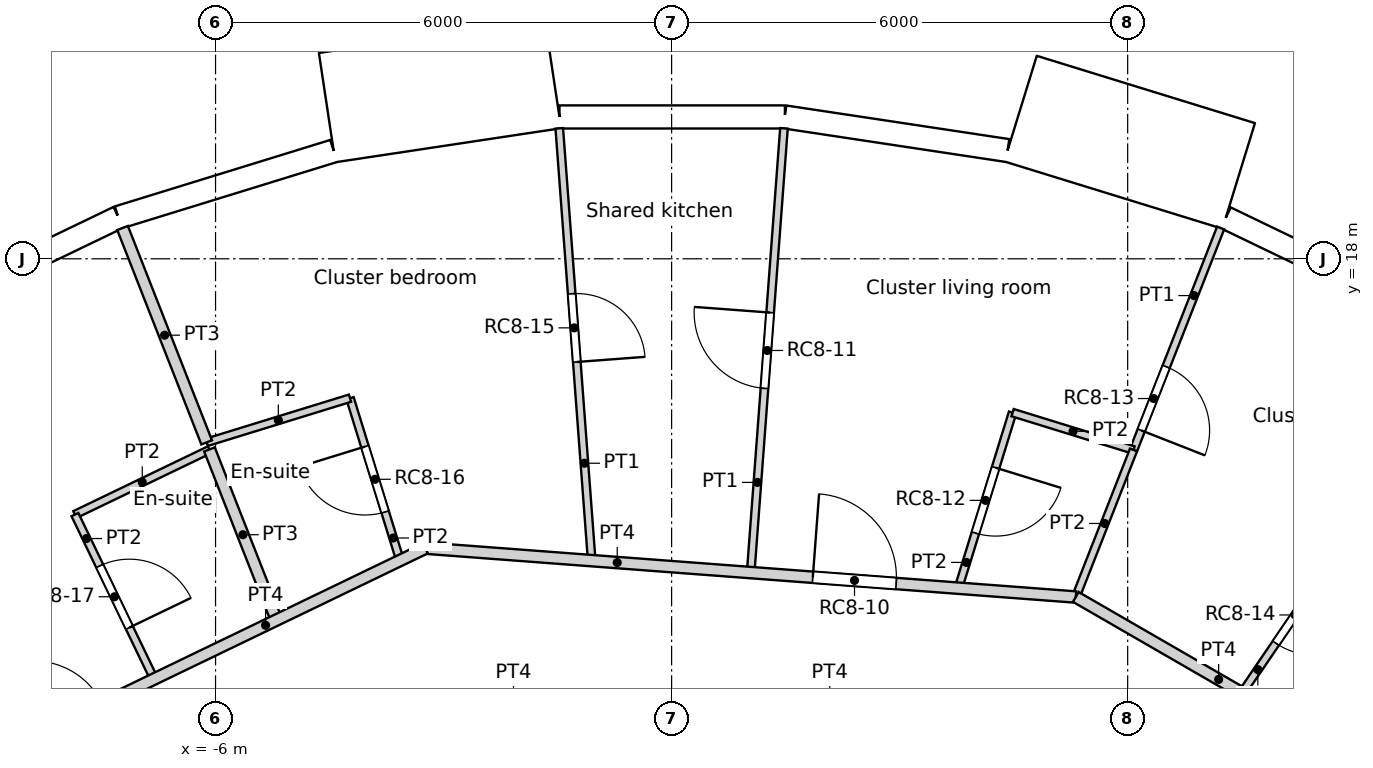
"""IFC4 building model, lengths in metres.
Left out: names, types, materials, properties, quantities, classifications, styles, units other than length and angle.
Written with IfcOpenShell. Run it as: python <this file> out.ifc"""

import sys

from ifc_helpers import new_model, si_unit, direction, frame, frame_2d, origin, origin_2d, place, context, subcontext, project, spatial, rectangle, circle, extrude, element, fill, save


model = new_model("IFC4")
c1 = context("Model", 3, precision=1e-05, world=origin(), true_north=direction((0.0, 1.0)))
c2 = subcontext(c1, "Body", "Model", "MODEL_VIEW")
j1 = project(units=[si_unit("LENGTHUNIT", "METRE"), si_unit("PLANEANGLEUNIT", "RADIAN")], contexts=[c1])
p1 = place(None, origin())
s1 = spatial("IfcSite", under=j1, at=p1, CompositionType="ELEMENT")
p2 = place(p1, origin())
s2 = spatial("IfcBuilding", under=s1, at=p2, CompositionType="ELEMENT")
p3 = place(p2, frame((0.0, 0.0, 305.4)))
s3 = spatial("IfcBuildingStorey", under=s2, at=p3, CompositionType="ELEMENT", Elevation=305.4)
for number, where, z_axis, x_axis in (
    (1, (6.876, 17.521, 0.0), (0.0, 0.0, 1.0), (1.0, 0.0, 0.0)),
    (2, (1.406, 18.77, 0.0), (0.0, 0.0, 1.0), (1.0, 0.0, 0.0)),
    (3, (-4.188, 18.35, 0.0), (0.0, 0.0, 1.0), (1.0, 0.0, 0.0)),
):
    element("IfcColumn", number, at=place(p3, frame(where, z_axis=z_axis, x_axis=x_axis)), inside=s3, PredefinedType="COLUMN", context=c2, shape_type="SweptSolid", body=[
        extrude(circle(Radius=0.45, at=origin_2d()), origin(), (0.0, 0.0, 1.0), 3.6),
    ])
p4 = place(p3, frame((9.961, 17.253, 0.0), z_axis=(0.0, 0.0, 1.0), x_axis=(-0.90095513435, 0.433912255978, 0.0)))
e4 = element("IfcWall", 4, at=p4, inside=s3, PredefinedType="SOLIDWALL", context=c2, shape_type="SweptSolid", body=[
    extrude(rectangle(XDim=2.962, YDim=0.3, at=frame_2d((1.481, 0.0))), origin(), (0.0, 0.0, 1.0), 3.25),
])
p5 = place(p4, frame((1.481, 0.0, 1.55)))
e5 = element("IfcOpeningElement", 5, at=p5, cuts=e4, PredefinedType="OPENING", context=c2, shape_type="SweptSolid", body=[
    extrude(circle(Radius=0.9, at=origin_2d()), frame((0.0, 0.16, 0.0), z_axis=(0.0, -1.0, 0.0), x_axis=(1.0, 0.0, 0.0)), (0.0, 0.0, 1.0), 0.32),
])
p6 = place(p3, frame((7.458, 19.091, -0.35), z_axis=(0.0, 0.0, 1.0), x_axis=(-0.955571139978, 0.294760574774, 0.0)))
e6 = element("IfcWall", 6, at=p6, inside=s3, PredefinedType="ELEMENTEDWALL", context=c2, shape_type="SweptSolid", body=[
    extrude(rectangle(XDim=3.0, YDim=1.45, at=frame_2d((1.5, 0.0))), origin(), (0.0, 0.0, 1.0), 3.6),
])
p7 = place(p6, frame((1.5, 0.0, 1.9)))
e7 = element("IfcOpeningElement", 7, at=p7, cuts=e6, PredefinedType="OPENING", context=c2, shape_type="SweptSolid", body=[
    extrude(circle(Radius=0.9, at=origin_2d()), frame((0.0, 0.735, 0.0), z_axis=(0.0, -1.0, 0.0), x_axis=(1.0, 0.0, 0.0)), (0.0, 0.0, 1.0), 1.47),
])
p8 = place(p3, frame((4.418, 19.425, 0.0), z_axis=(0.0, 0.0, 1.0), x_axis=(-0.988835775663, 0.149009425104, 0.0)))
e8 = element("IfcWall", 8, at=p8, inside=s3, PredefinedType="SOLIDWALL", context=c2, shape_type="SweptSolid", body=[
    extrude(rectangle(XDim=2.962, YDim=0.3, at=frame_2d((1.481, 0.0))), origin(), (0.0, 0.0, 1.0), 2.8),
])
p9 = place(p8, frame((1.481, 0.0, 1.55)))
e9 = element("IfcOpeningElement", 9, at=p9, cuts=e8, PredefinedType="OPENING", context=c2, shape_type="SweptSolid", body=[
    extrude(circle(Radius=0.9, at=origin_2d()), frame((0.0, 0.16, 0.0), z_axis=(0.0, -1.0, 0.0), x_axis=(1.0, 0.0, 0.0)), (0.0, 0.0, 1.0), 0.32),
])
p10 = place(p3, frame((1.489, 19.866, 0.0), z_axis=(0.0, 0.0, 1.0), x_axis=(-1.0, 0.0, 0.0)))
e10 = element("IfcWall", 10, at=p10, inside=s3, PredefinedType="SOLIDWALL", context=c2, shape_type="SweptSolid", body=[
    extrude(rectangle(XDim=2.962, YDim=0.3, at=frame_2d((1.481, 0.0))), origin(), (0.0, 0.0, 1.0), 3.25),
])
p11 = place(p10, frame((1.481, 0.0, 1.55)))
e11 = element("IfcOpeningElement", 11, at=p11, cuts=e10, PredefinedType="OPENING", context=c2, shape_type="SweptSolid", body=[
    extrude(circle(Radius=0.9, at=origin_2d()), frame((0.0, 0.16, 0.0), z_axis=(0.0, -1.0, 0.0), x_axis=(1.0, 0.0, 0.0)), (0.0, 0.0, 1.0), 0.32),
])
p12 = place(p3, frame((-1.563, 20.436, -0.35), z_axis=(0.0, 0.0, 1.0), x_axis=(-0.988836445254, -0.149004981587, 0.0)))
e12 = element("IfcWall", 12, at=p12, inside=s3, PredefinedType="ELEMENTEDWALL", context=c2, shape_type="SweptSolid", body=[
    extrude(rectangle(XDim=3.0, YDim=1.45, at=frame_2d((1.5, 0.0))), origin(), (0.0, 0.0, 1.0), 3.6),
])
p13 = place(p12, frame((1.5, 0.0, 1.9)))
e13 = element("IfcOpeningElement", 13, at=p13, cuts=e12, PredefinedType="OPENING", context=c2, shape_type="SweptSolid", body=[
    extrude(circle(Radius=0.9, at=origin_2d()), frame((0.0, 0.735, 0.0), z_axis=(0.0, -1.0, 0.0), x_axis=(1.0, 0.0, 0.0)), (0.0, 0.0, 1.0), 1.47),
])
p14 = place(p3, frame((-4.448, 19.418, 0.0), z_axis=(0.0, 0.0, 1.0), x_axis=(-0.95558635705, -0.294711238707, 0.0)))
e14 = element("IfcWall", 14, at=p14, inside=s3, PredefinedType="SOLIDWALL", context=c2, shape_type="SweptSolid", body=[
    extrude(rectangle(XDim=2.962, YDim=0.3, at=frame_2d((1.481, 0.0))), origin(), (0.0, 0.0, 1.0), 2.8),
])
p15 = place(p14, frame((1.481, 0.0, 1.55)))
e15 = element("IfcOpeningElement", 15, at=p15, cuts=e14, PredefinedType="OPENING", context=c2, shape_type="SweptSolid", body=[
    extrude(circle(Radius=0.9, at=origin_2d()), frame((0.0, 0.16, 0.0), z_axis=(0.0, -1.0, 0.0), x_axis=(1.0, 0.0, 0.0)), (0.0, 0.0, 1.0), 0.32),
])
p16 = place(p3, frame((-7.278, 18.545, 0.0), z_axis=(0.0, 0.0, 1.0), x_axis=(-0.900939615635, -0.433944476838, 0.0)))
e16 = element("IfcWall", 16, at=p16, inside=s3, PredefinedType="SOLIDWALL", context=c2, shape_type="SweptSolid", body=[
    extrude(rectangle(XDim=2.962, YDim=0.3, at=frame_2d((1.481, 0.0))), origin(), (0.0, 0.0, 1.0), 3.25),
])
p17 = place(p16, frame((1.481, 0.0, 1.55)))
e17 = element("IfcOpeningElement", 17, at=p17, cuts=e16, PredefinedType="OPENING", context=c2, shape_type="SweptSolid", body=[
    extrude(circle(Radius=0.9, at=origin_2d()), frame((0.0, 0.16, 0.0), z_axis=(0.0, -1.0, 0.0), x_axis=(1.0, 0.0, 0.0)), (0.0, 0.0, 1.0), 0.32),
])
p18 = place(p3, frame((-3.239, 14.193, 0.0), z_axis=(0.0, 0.0, 1.0), x_axis=(0.997187999346, -0.074940602878, 0.0)))
e18 = element("IfcWall", 18, at=p18, inside=s3, PredefinedType="PARTITIONING", context=c2, shape_type="SweptSolid", body=[
    extrude(rectangle(XDim=8.581, YDim=0.15, at=frame_2d((4.291, 0.0))), origin(), (0.0, 0.0, 1.0), 3.25),
])
p19 = place(p18, frame((5.111, 0.0, 0.0)))
e19 = element("IfcOpeningElement", 19, at=p19, cuts=e18, PredefinedType="OPENING", context=c2, shape_type="SweptSolid", body=[
    extrude(rectangle(XDim=1.1, YDim=2.1, at=frame_2d((0.55, 1.05))), frame((0.0, 0.075, 0.0), z_axis=(0.0, -1.0, 0.0), x_axis=(1.0, 0.0, 0.0)), (0.0, 0.0, 1.0), 0.15),
])
p20 = place(p3, frame((5.318, 13.551, 0.0), z_axis=(0.0, 0.0, 1.0), x_axis=(0.865990693744, -0.500060114735, 0.0)))
e20 = element("IfcWall", 20, at=p20, inside=s3, PredefinedType="PARTITIONING", context=c2, shape_type="SweptSolid", body=[
    extrude(rectangle(XDim=4.339, YDim=0.15, at=frame_2d((2.17, 0.0))), origin(), (0.0, 0.0, 1.0), 3.25),
])
p21 = place(p3, frame((-9.075, 11.378, 0.0), z_axis=(0.0, 0.0, 1.0), x_axis=(0.900778421649, 0.434278983018, 0.0)))
e21 = element("IfcWall", 21, at=p21, inside=s3, PredefinedType="PARTITIONING", context=c2, shape_type="SweptSolid", body=[
    extrude(rectangle(XDim=6.479, YDim=0.15, at=frame_2d((3.239, 0.0))), origin(), (0.0, 0.0, 1.0), 3.25),
])
p22 = place(p21, frame((0.76, 0.0, 0.0)))
e22 = element("IfcOpeningElement", 22, at=p22, cuts=e21, PredefinedType="OPENING", context=c2, shape_type="SweptSolid", body=[
    extrude(rectangle(XDim=1.0, YDim=2.1, at=frame_2d((0.5, 1.05))), frame((0.0, 0.075, 0.0), z_axis=(0.0, -1.0, 0.0), x_axis=(1.0, 0.0, 0.0)), (0.0, 0.0, 1.0), 0.15),
])
p23 = place(p3, frame((1.04, 13.871, 0.0), z_axis=(0.0, 0.0, 1.0), x_axis=(0.074724712234, 0.997204200443, 0.0)))
e23 = element("IfcWall", 23, at=p23, inside=s3, PredefinedType="PARTITIONING", context=c2, shape_type="SweptSolid", body=[
    extrude(rectangle(XDim=5.861, YDim=0.1, at=frame_2d((2.931, 0.0))), origin(), (0.0, 0.0, 1.0), 3.25),
])
p24 = place(p23, frame((2.431, 0.0, 0.0)))
e24 = element("IfcOpeningElement", 24, at=p24, cuts=e23, PredefinedType="OPENING", context=c2, shape_type="SweptSolid", body=[
    extrude(rectangle(XDim=1.0, YDim=2.04, at=frame_2d((0.5, 1.02))), frame((0.0, 0.05, 0.0), z_axis=(0.0, -1.0, 0.0), x_axis=(1.0, 0.0, 0.0)), (0.0, 0.0, 1.0), 0.1),
])
p25 = place(p3, frame((4.486, 15.976, 0.0), z_axis=(0.0, 0.0, 1.0), x_axis=(0.955528179313, -0.294899811019, 0.0)))
e25 = element("IfcWall", 25, at=p25, inside=s3, PredefinedType="PARTITIONING", context=c2, shape_type="SweptSolid", body=[
    extrude(rectangle(XDim=1.665, YDim=0.1, at=frame_2d((0.833, 0.0))), origin(), (0.0, 0.0, 1.0), 3.25),
])
p26 = place(p3, frame((3.773, 13.667, 0.0), z_axis=(0.0, 0.0, 1.0), x_axis=(0.295086629105, 0.955470502592, 0.0)))
e26 = element("IfcWall", 26, at=p26, inside=s3, PredefinedType="PARTITIONING", context=c2, shape_type="SweptSolid", body=[
    extrude(rectangle(XDim=2.417, YDim=0.1, at=frame_2d((1.208, 0.0))), origin(), (0.0, 0.0, 1.0), 3.25),
])
p27 = place(p26, frame((0.759, 0.0, 0.0)))
e27 = element("IfcOpeningElement", 27, at=p27, cuts=e26, PredefinedType="OPENING", context=c2, shape_type="SweptSolid", body=[
    extrude(rectangle(XDim=0.9, YDim=2.0, at=frame_2d((0.45, 1.0))), frame((0.0, 0.05, 0.0), z_axis=(0.0, -1.0, 0.0), x_axis=(1.0, 0.0, 0.0)), (0.0, 0.0, 1.0), 0.1),
])
p28 = place(p3, frame((6.077, 15.485, 0.0), z_axis=(0.0, 0.0, 1.0), x_axis=(0.365344119851, 0.93087253375, 0.0)))
e28 = element("IfcWall", 28, at=p28, inside=s3, PredefinedType="PARTITIONING", context=c2, shape_type="SweptSolid", body=[
    extrude(rectangle(XDim=3.137, YDim=0.1, at=frame_2d((1.568, 0.0))), origin(), (0.0, 0.0, 1.0), 3.25),
])
p29 = place(p28, frame((0.277, 0.0, 0.0)))
e29 = element("IfcOpeningElement", 29, at=p29, cuts=e28, PredefinedType="OPENING", context=c2, shape_type="SweptSolid", body=[
    extrude(rectangle(XDim=0.9, YDim=2.1, at=frame_2d((0.45, 1.05))), frame((0.0, 0.05, 0.0), z_axis=(0.0, -1.0, 0.0), x_axis=(1.0, 0.0, 0.0)), (0.0, 0.0, 1.0), 0.1),
])
p30 = place(p3, frame((-1.478, 19.716, 0.0), z_axis=(0.0, 0.0, 1.0), x_axis=(0.074860175832, -0.997194040332, 0.0)))
e30 = element("IfcWall", 30, at=p30, inside=s3, PredefinedType="PARTITIONING", context=c2, shape_type="SweptSolid", body=[
    extrude(rectangle(XDim=5.704, YDim=0.1, at=frame_2d((2.852, 0.0))), origin(), (0.0, 0.0, 1.0), 3.25),
])
p31 = place(p30, frame((2.182, 0.0, 0.0)))
e31 = element("IfcOpeningElement", 31, at=p31, cuts=e30, PredefinedType="OPENING", context=c2, shape_type="SweptSolid", body=[
    extrude(rectangle(XDim=0.9, YDim=2.1, at=frame_2d((0.45, 1.05))), frame((0.0, 0.05, 0.0), z_axis=(0.0, -1.0, 0.0), x_axis=(1.0, 0.0, 0.0)), (0.0, 0.0, 1.0), 0.1),
])
p32 = place(p3, frame((5.318, 13.551, 0.0), z_axis=(0.0, 0.0, 1.0), x_axis=(0.365223322063, 0.930919934807, 0.0)))
e32 = element("IfcWall", 32, at=p32, inside=s3, PredefinedType="PARTITIONING", context=c2, shape_type="SweptSolid", body=[
    extrude(rectangle(XDim=2.078, YDim=0.1, at=frame_2d((1.039, 0.0))), origin(), (0.0, 0.0, 1.0), 3.25),
])
p33 = place(p3, frame((7.504, 12.289, 0.0), z_axis=(0.0, 0.0, 1.0), x_axis=(0.563272733387, 0.826271037749, 0.0)))
e33 = element("IfcWall", 33, at=p33, inside=s3, PredefinedType="PARTITIONING", context=c2, shape_type="SweptSolid", body=[
    extrude(rectangle(XDim=2.482, YDim=0.1, at=frame_2d((1.241, 0.0))), origin(), (0.0, 0.0, 1.0), 3.25),
])
p34 = place(p33, frame((0.791, 0.0, 0.0)))
e34 = element("IfcOpeningElement", 34, at=p34, cuts=e33, PredefinedType="OPENING", context=c2, shape_type="SweptSolid", body=[
    extrude(rectangle(XDim=0.9, YDim=2.04, at=frame_2d((0.45, 1.02))), frame((0.0, 0.05, 0.0), z_axis=(0.0, -1.0, 0.0), x_axis=(1.0, 0.0, 0.0)), (0.0, 0.0, 1.0), 0.1),
])
p35 = place(p3, frame((-4.231, 16.166, 0.0), z_axis=(0.0, 0.0, 1.0), x_axis=(0.295030507093, -0.955487833457, 0.0)))
e35 = element("IfcWall", 35, at=p35, inside=s3, PredefinedType="PARTITIONING", context=c2, shape_type="SweptSolid", body=[
    extrude(rectangle(XDim=2.233, YDim=0.1, at=frame_2d((1.117, 0.0))), origin(), (0.0, 0.0, 1.0), 3.25),
])
p36 = place(p35, frame((0.667, 0.0, 0.0)))
e36 = element("IfcOpeningElement", 36, at=p36, cuts=e35, PredefinedType="OPENING", context=c2, shape_type="SweptSolid", body=[
    extrude(rectangle(XDim=0.9, YDim=2.04, at=frame_2d((0.45, 1.02))), frame((0.0, 0.05, 0.0), z_axis=(0.0, -1.0, 0.0), x_axis=(1.0, 0.0, 0.0)), (0.0, 0.0, 1.0), 0.1),
])
p37 = place(p3, frame((-6.117, 15.585, 0.0), z_axis=(0.0, 0.0, 1.0), x_axis=(0.955671951668, 0.294433559219, 0.0)))
e37 = element("IfcWall", 37, at=p37, inside=s3, PredefinedType="PARTITIONING", context=c2, shape_type="SweptSolid", body=[
    extrude(rectangle(XDim=1.973, YDim=0.1, at=frame_2d((0.987, 0.0))), origin(), (0.0, 0.0, 1.0), 3.25),
])
p38 = place(p3, frame((-7.223, 18.405, 0.0), z_axis=(0.0, 0.0, 1.0), x_axis=(0.365101225584, -0.93096782709, 0.0)))
e38 = element("IfcWall", 38, at=p38, inside=s3, PredefinedType="PARTITIONING", context=c2, shape_type="SweptSolid", body=[
    extrude(rectangle(XDim=3.029, YDim=0.15, at=frame_2d((1.515, 0.0))), origin(), (0.0, 0.0, 1.0), 3.25),
])
p39 = place(p3, frame((-6.08, 15.492, 0.0), z_axis=(0.0, 0.0, 1.0), x_axis=(0.36549883342, -0.930811797717, 0.0)))
e39 = element("IfcWall", 39, at=p39, inside=s3, PredefinedType="PARTITIONING", context=c2, shape_type="SweptSolid", body=[
    extrude(rectangle(XDim=2.411, YDim=0.15, at=frame_2d((1.205, 0.0))), origin(), (0.0, 0.0, 1.0), 3.25),
])
p40 = place(p3, frame((-7.85, 14.635, 0.0), z_axis=(0.0, 0.0, 1.0), x_axis=(0.900936932599, 0.433950047216, 0.0)))
e40 = element("IfcWall", 40, at=p40, inside=s3, PredefinedType="PARTITIONING", context=c2, shape_type="SweptSolid", body=[
    extrude(rectangle(XDim=1.966, YDim=0.1, at=frame_2d((0.983, 0.0))), origin(), (0.0, 0.0, 1.0), 3.25),
])
p41 = place(p3, frame((-7.85, 14.635, 0.0), z_axis=(0.0, 0.0, 1.0), x_axis=(0.433815618773, -0.901001669759, 0.0)))
e41 = element("IfcWall", 41, at=p41, inside=s3, PredefinedType="PARTITIONING", context=c2, shape_type="SweptSolid", body=[
    extrude(rectangle(XDim=2.4, YDim=0.1, at=frame_2d((1.2, 0.0))), origin(), (0.0, 0.0, 1.0), 3.25),
])
p42 = place(p41, frame((0.75, 0.0, 0.0)))
e42 = element("IfcOpeningElement", 42, at=p42, cuts=e41, PredefinedType="OPENING", context=c2, shape_type="SweptSolid", body=[
    extrude(rectangle(XDim=0.9, YDim=2.04, at=frame_2d((0.45, 1.02))), frame((0.0, 0.05, 0.0), z_axis=(0.0, -1.0, 0.0), x_axis=(1.0, 0.0, 0.0)), (0.0, 0.0, 1.0), 0.1),
])
p43 = place(p5, origin())
e43 = element("IfcWindow", 43, at=p43, inside=s3, PartitioningType="SINGLE_PANEL", PredefinedType="WINDOW", context=c2, shape_type="SweptSolid", body=[
    extrude(circle(Radius=0.9, at=origin_2d()), frame((0.0, 0.12, 0.0), z_axis=(0.0, -1.0, 0.0), x_axis=(1.0, 0.0, 0.0)), (0.0, 0.0, 1.0), 0.1),
])
fill(e5, e43)
p44 = place(p7, origin())
e44 = element("IfcWindow", 44, at=p44, inside=s3, PartitioningType="SINGLE_PANEL", PredefinedType="WINDOW", context=c2, shape_type="SweptSolid", body=[
    extrude(circle(Radius=0.9, at=origin_2d()), frame((0.0, 0.695, 0.0), z_axis=(0.0, -1.0, 0.0), x_axis=(1.0, 0.0, 0.0)), (0.0, 0.0, 1.0), 0.1),
])
fill(e7, e44)
p45 = place(p9, origin())
e45 = element("IfcWindow", 45, at=p45, inside=s3, PartitioningType="SINGLE_PANEL", PredefinedType="WINDOW", context=c2, shape_type="SweptSolid", body=[
    extrude(circle(Radius=0.9, at=origin_2d()), frame((0.0, 0.12, 0.0), z_axis=(0.0, -1.0, 0.0), x_axis=(1.0, 0.0, 0.0)), (0.0, 0.0, 1.0), 0.1),
])
fill(e9, e45)
p46 = place(p11, origin())
e46 = element("IfcWindow", 46, at=p46, inside=s3, PartitioningType="SINGLE_PANEL", PredefinedType="WINDOW", context=c2, shape_type="SweptSolid", body=[
    extrude(circle(Radius=0.9, at=origin_2d()), frame((0.0, 0.12, 0.0), z_axis=(0.0, -1.0, 0.0), x_axis=(1.0, 0.0, 0.0)), (0.0, 0.0, 1.0), 0.1),
])
fill(e11, e46)
p47 = place(p13, origin())
e47 = element("IfcWindow", 47, at=p47, inside=s3, PartitioningType="SINGLE_PANEL", PredefinedType="WINDOW", context=c2, shape_type="SweptSolid", body=[
    extrude(circle(Radius=0.9, at=origin_2d()), frame((0.0, 0.695, 0.0), z_axis=(0.0, -1.0, 0.0), x_axis=(1.0, 0.0, 0.0)), (0.0, 0.0, 1.0), 0.1),
])
fill(e13, e47)
p48 = place(p15, origin())
e48 = element("IfcWindow", 48, at=p48, inside=s3, PartitioningType="SINGLE_PANEL", PredefinedType="WINDOW", context=c2, shape_type="SweptSolid", body=[
    extrude(circle(Radius=0.9, at=origin_2d()), frame((0.0, 0.12, 0.0), z_axis=(0.0, -1.0, 0.0), x_axis=(1.0, 0.0, 0.0)), (0.0, 0.0, 1.0), 0.1),
])
fill(e15, e48)
p49 = place(p17, origin())
e49 = element("IfcWindow", 49, at=p49, inside=s3, PartitioningType="SINGLE_PANEL", PredefinedType="WINDOW", context=c2, shape_type="SweptSolid", body=[
    extrude(circle(Radius=0.9, at=origin_2d()), frame((0.0, 0.12, 0.0), z_axis=(0.0, -1.0, 0.0), x_axis=(1.0, 0.0, 0.0)), (0.0, 0.0, 1.0), 0.1),
])
fill(e17, e49)
p50 = place(p19, origin())
e50 = element("IfcDoor", 50, at=p50, inside=s3, OperationType="SINGLE_SWING_LEFT", PredefinedType="DOOR", context=c2, shape_type="SweptSolid", body=[
    extrude(rectangle(XDim=1.1, YDim=2.1, at=frame_2d((0.55, 1.05))), frame((0.0, 0.025, 0.0), z_axis=(0.0, -1.0, 0.0), x_axis=(1.0, 0.0, 0.0)), (0.0, 0.0, 1.0), 0.05),
])
fill(e19, e50)
p51 = place(p24, origin())
e51 = element("IfcDoor", 51, at=p51, inside=s3, OperationType="SINGLE_SWING_RIGHT", PredefinedType="DOOR", context=c2, shape_type="SweptSolid", body=[
    extrude(rectangle(XDim=1.0, YDim=2.04, at=frame_2d((0.5, 1.02))), frame((0.0, 0.025, 0.0), z_axis=(0.0, -1.0, 0.0), x_axis=(1.0, 0.0, 0.0)), (0.0, 0.0, 1.0), 0.05),
])
fill(e24, e51)
p52 = place(p27, origin())
e52 = element("IfcDoor", 52, at=p52, inside=s3, OperationType="SINGLE_SWING_LEFT", PredefinedType="DOOR", context=c2, shape_type="SweptSolid", body=[
    extrude(rectangle(XDim=0.9, YDim=2.0, at=frame_2d((0.45, 1.0))), frame((0.0, 0.025, 0.0), z_axis=(0.0, -1.0, 0.0), x_axis=(1.0, 0.0, 0.0)), (0.0, 0.0, 1.0), 0.05),
])
fill(e27, e52)
p53 = place(p29, origin())
e53 = element("IfcDoor", 53, at=p53, inside=s3, OperationType="SINGLE_SWING_RIGHT", PredefinedType="DOOR", context=c2, shape_type="SweptSolid", body=[
    extrude(rectangle(XDim=0.9, YDim=2.1, at=frame_2d((0.45, 1.05))), frame((0.0, 0.025, 0.0), z_axis=(0.0, -1.0, 0.0), x_axis=(1.0, 0.0, 0.0)), (0.0, 0.0, 1.0), 0.05),
])
fill(e29, e53)
p54 = place(p34, origin())
e54 = element("IfcDoor", 54, at=p54, inside=s3, OperationType="SINGLE_SWING_LEFT", PredefinedType="DOOR", context=c2, shape_type="SweptSolid", body=[
    extrude(rectangle(XDim=0.9, YDim=2.04, at=frame_2d((0.45, 1.02))), frame((0.0, 0.025, 0.0), z_axis=(0.0, -1.0, 0.0), x_axis=(1.0, 0.0, 0.0)), (0.0, 0.0, 1.0), 0.05),
])
fill(e34, e54)
p55 = place(p31, origin())
e55 = element("IfcDoor", 55, at=p55, inside=s3, OperationType="SINGLE_SWING_RIGHT", PredefinedType="DOOR", context=c2, shape_type="SweptSolid", body=[
    extrude(rectangle(XDim=0.9, YDim=2.1, at=frame_2d((0.45, 1.05))), frame((0.0, 0.025, 0.0), z_axis=(0.0, -1.0, 0.0), x_axis=(1.0, 0.0, 0.0)), (0.0, 0.0, 1.0), 0.05),
])
fill(e31, e55)
p56 = place(p36, origin())
e56 = element("IfcDoor", 56, at=p56, inside=s3, OperationType="SINGLE_SWING_RIGHT", PredefinedType="DOOR", context=c2, shape_type="SweptSolid", body=[
    extrude(rectangle(XDim=0.9, YDim=2.04, at=frame_2d((0.45, 1.02))), frame((0.0, 0.025, 0.0), z_axis=(0.0, -1.0, 0.0), x_axis=(1.0, 0.0, 0.0)), (0.0, 0.0, 1.0), 0.05),
])
fill(e36, e56)
p57 = place(p42, origin())
e57 = element("IfcDoor", 57, at=p57, inside=s3, OperationType="SINGLE_SWING_RIGHT", PredefinedType="DOOR", context=c2, shape_type="SweptSolid", body=[
    extrude(rectangle(XDim=0.9, YDim=2.04, at=frame_2d((0.45, 1.02))), frame((0.0, 0.025, 0.0), z_axis=(0.0, -1.0, 0.0), x_axis=(1.0, 0.0, 0.0)), (0.0, 0.0, 1.0), 0.05),
])
fill(e42, e57)
save(model, sys.argv[1])
